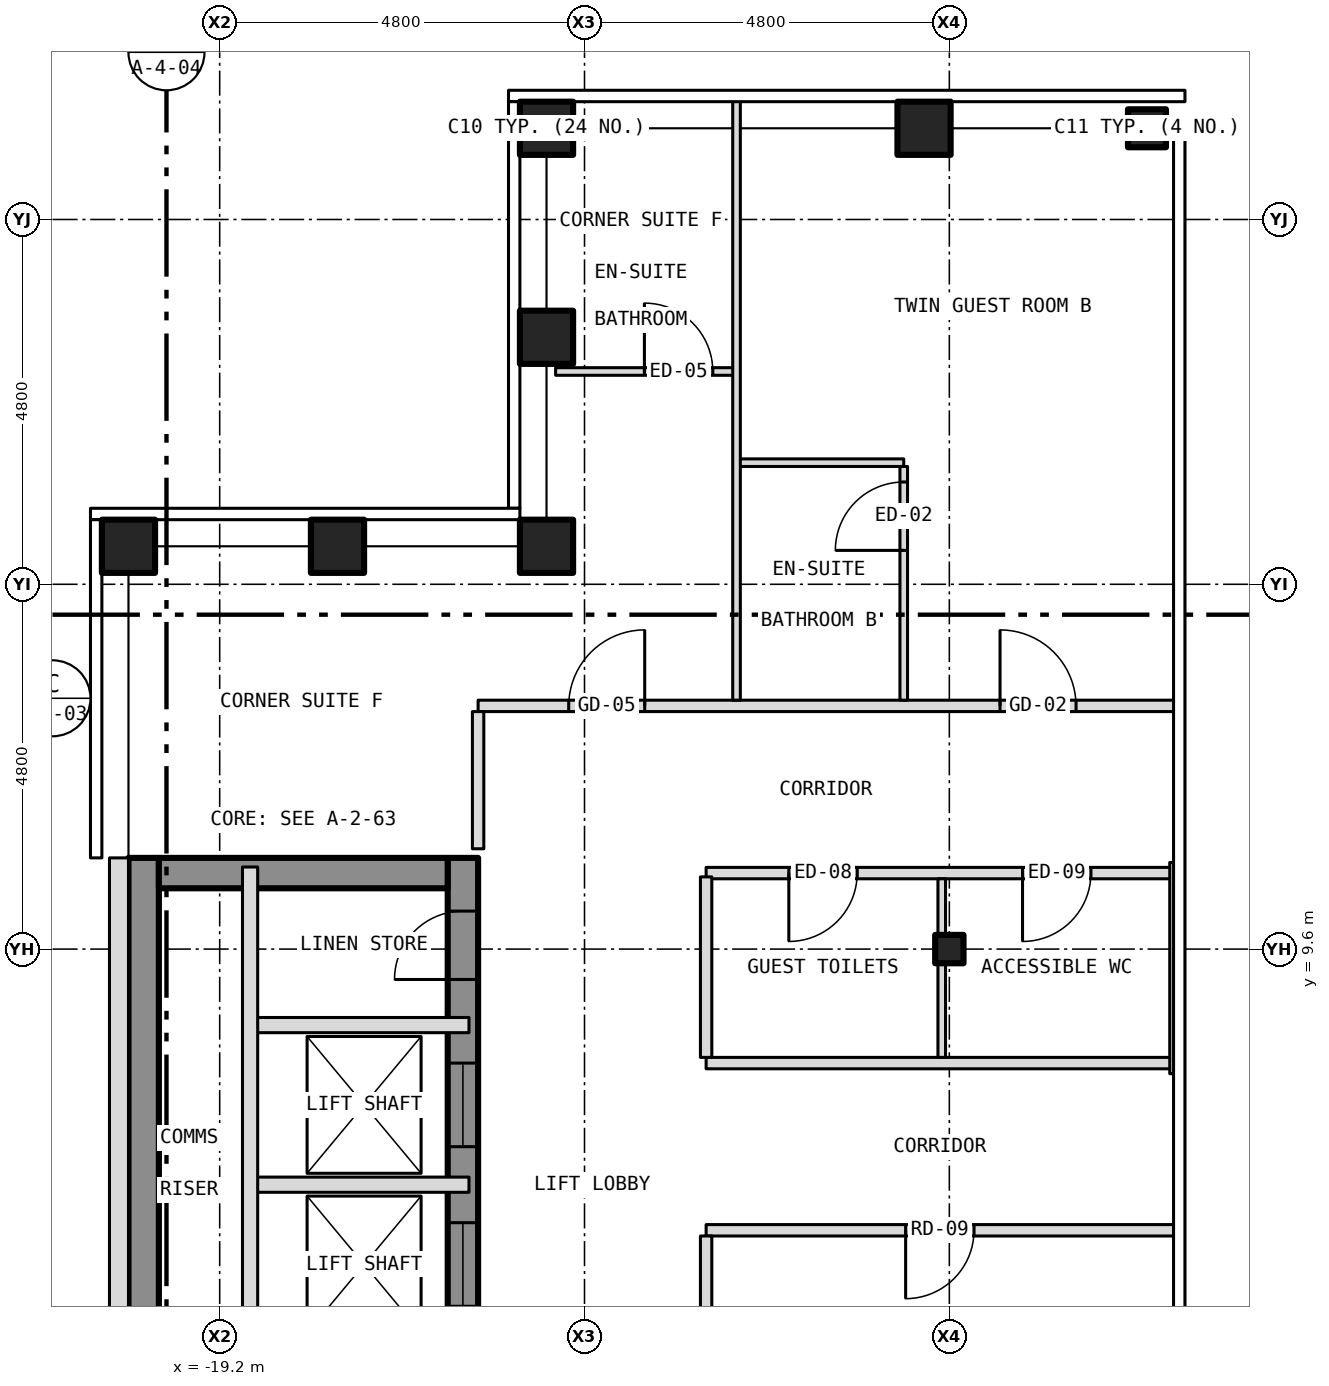
"""IFC4 building model, lengths in metres.
Left out: names, types, materials, properties, quantities, classifications, styles, units other than length and angle.
Written with IfcOpenShell. Run it as: python <this file> out.ifc"""

import sys

from ifc_helpers import new_model, si_unit, direction, frame, frame_2d, origin, origin_2d, place, context, subcontext, project, spatial, rectangle, hollow_rectangle, i_section, extrude, element, fill, save


model = new_model("IFC4")
c1 = context("Model", 3, precision=1e-05, world=origin(), true_north=direction((0.0, 1.0)))
c2 = subcontext(c1, "Body", "Model", "MODEL_VIEW")
j1 = project(units=[si_unit("LENGTHUNIT", "METRE"), si_unit("PLANEANGLEUNIT", "RADIAN")], contexts=[c1])
p1 = place(None, origin())
s1 = spatial("IfcSite", under=j1, at=p1, CompositionType="ELEMENT")
p2 = place(p1, origin())
s2 = spatial("IfcBuilding", under=s1, at=p2, CompositionType="ELEMENT")
p3 = place(p2, frame((0.0, 0.0, 229.5)))
s3 = spatial("IfcBuildingStorey", under=s2, at=p3, CompositionType="ELEMENT", Elevation=229.5)
for number, where, z_axis, x_axis in (
    (1, (-14.9, 20.4, -0.15), (0.0, 0.0, 1.0), (1.0, 0.0, 0.0)),
    (2, (-9.933, 20.4, -0.15), (0.0, 0.0, 1.0), (1.0, 0.0, 0.0)),
    (3, (-20.4, 14.9, -0.15), (0.0, 0.0, 1.0), (1.0, 0.0, 0.0)),
    (4, (-14.9, 14.9, -0.15), (0.0, 0.0, 1.0), (1.0, 0.0, 0.0)),
    (5, (-14.9, 17.65, -0.15), (0.0, 0.0, 1.0), (1.0, 0.0, 0.0)),
    (6, (-17.65, 14.9, -0.15), (0.0, 0.0, 1.0), (1.0, 0.0, 0.0)),
):
    element("IfcColumn", number, at=place(p3, frame(where, z_axis=z_axis, x_axis=x_axis)), inside=s3, PredefinedType="COLUMN", context=c2, shape_type="SweptSolid", body=[
        extrude(hollow_rectangle(XDim=0.7, YDim=0.7, WallThickness=0.04, at=origin_2d()), origin(), (0.0, 0.0, 1.0), 3.5),
    ])
p4 = place(p3, frame((-7.0, 20.4, -0.15), z_axis=(0.0, 0.0, 1.0), x_axis=(1.0, 0.0, 0.0)))
e7 = element("IfcColumn", 7, at=p4, inside=s3, PredefinedType="COLUMN", context=c2, shape_type="SweptSolid", body=[
    extrude(hollow_rectangle(XDim=0.5, YDim=0.5, WallThickness=0.03, at=origin_2d()), origin(), (0.0, 0.0, 1.0), 3.5),
])
p5 = place(p3, frame((-9.6, 9.6, -0.15), z_axis=(0.0, 0.0, 1.0), x_axis=(1.0, 0.0, 0.0)))
e8 = element("IfcColumn", 8, at=p5, inside=s3, PredefinedType="COLUMN", context=c2, shape_type="SweptSolid", body=[
    extrude(i_section(OverallWidth=0.373, OverallDepth=0.373, WebThickness=0.016, FlangeThickness=0.026, at=origin_2d()), origin(), (0.0, 0.0, 1.0), 3.5),
])
p6 = place(p3, frame((-16.0, -10.8, 0.0), z_axis=(0.0, 0.0, 1.0), x_axis=(0.0, 1.0, 0.0)))
e9 = element("IfcWall", 9, at=p6, inside=s3, PredefinedType="SHEAR", context=c2, shape_type="SweptSolid", body=[
    extrude(rectangle(XDim=21.6, YDim=0.4, at=frame_2d((10.8, 0.0))), origin(), (0.0, 0.0, 1.0), 3.25),
])
p7 = place(p6, frame((9.4, 0.0, 0.0)))
e10 = element("IfcOpeningElement", 10, at=p7, cuts=e9, PredefinedType="OPENING", context=c2, shape_type="SweptSolid", body=[
    extrude(rectangle(XDim=1.1, YDim=2.1, at=frame_2d((0.55, 1.05))), frame((0.0, 0.212, 0.0), z_axis=(0.0, -1.0, 0.0), x_axis=(1.0, 0.0, 0.0)), (0.0, 0.0, 1.0), 0.424),
])
p8 = place(p6, frame((11.5, 0.0, 0.0)))
e11 = element("IfcOpeningElement", 11, at=p8, cuts=e9, PredefinedType="OPENING", context=c2, shape_type="SweptSolid", body=[
    extrude(rectangle(XDim=1.1, YDim=2.1, at=frame_2d((0.55, 1.05))), frame((0.0, 0.212, 0.0), z_axis=(0.0, -1.0, 0.0), x_axis=(1.0, 0.0, 0.0)), (0.0, 0.0, 1.0), 0.424),
])
p9 = place(p6, frame((13.6, 0.0, 0.0)))
e12 = element("IfcOpeningElement", 12, at=p9, cuts=e9, PredefinedType="OPENING", context=c2, shape_type="SweptSolid", body=[
    extrude(rectangle(XDim=1.1, YDim=2.1, at=frame_2d((0.55, 1.05))), frame((0.0, 0.212, 0.0), z_axis=(0.0, -1.0, 0.0), x_axis=(1.0, 0.0, 0.0)), (0.0, 0.0, 1.0), 0.424),
])
p10 = place(p6, frame((15.7, 0.0, 0.0)))
e13 = element("IfcOpeningElement", 13, at=p10, cuts=e9, PredefinedType="OPENING", context=c2, shape_type="SweptSolid", body=[
    extrude(rectangle(XDim=1.1, YDim=2.1, at=frame_2d((0.55, 1.05))), frame((0.0, 0.212, 0.0), z_axis=(0.0, -1.0, 0.0), x_axis=(1.0, 0.0, 0.0)), (0.0, 0.0, 1.0), 0.424),
])
p11 = place(p6, frame((17.8, 0.0, 0.0)))
e14 = element("IfcOpeningElement", 14, at=p11, cuts=e9, PredefinedType="OPENING", context=c2, shape_type="SweptSolid", body=[
    extrude(rectangle(XDim=1.1, YDim=2.1, at=frame_2d((0.55, 1.05))), frame((0.0, 0.212, 0.0), z_axis=(0.0, -1.0, 0.0), x_axis=(1.0, 0.0, 0.0)), (0.0, 0.0, 1.0), 0.424),
])
p12 = place(p6, frame((0.458, 0.0, 0.0)))
e15 = element("IfcOpeningElement", 15, at=p12, cuts=e9, PredefinedType="OPENING", context=c2, shape_type="SweptSolid", body=[
    extrude(rectangle(XDim=1.1, YDim=2.1, at=frame_2d((0.55, 1.05))), frame((0.0, 0.212, 0.0), z_axis=(0.0, -1.0, 0.0), x_axis=(1.0, 0.0, 0.0)), (0.0, 0.0, 1.0), 0.424),
])
p13 = place(p6, frame((7.5, 0.0, 0.0)))
e16 = element("IfcOpeningElement", 16, at=p13, cuts=e9, PredefinedType="OPENING", context=c2, shape_type="SweptSolid", body=[
    extrude(rectangle(XDim=1.1, YDim=2.1, at=frame_2d((0.55, 1.05))), frame((0.0, 0.212, 0.0), z_axis=(0.0, -1.0, 0.0), x_axis=(1.0, 0.0, 0.0)), (0.0, 0.0, 1.0), 0.424),
])
p14 = place(p6, frame((20.0, 0.0, 0.0)))
e17 = element("IfcOpeningElement", 17, at=p14, cuts=e9, PredefinedType="OPENING", context=c2, shape_type="SweptSolid", body=[
    extrude(rectangle(XDim=0.9, YDim=2.1, at=frame_2d((0.45, 1.05))), frame((0.0, 0.212, 0.0), z_axis=(0.0, -1.0, 0.0), x_axis=(1.0, 0.0, 0.0)), (0.0, 0.0, 1.0), 0.424),
])
p15 = place(p3, frame((-20.2, -10.8, 0.0), z_axis=(0.0, 0.0, 1.0), x_axis=(0.0, 1.0, 0.0)))
e18 = element("IfcWall", 18, at=p15, inside=s3, PredefinedType="SHEAR", context=c2, shape_type="SweptSolid", body=[
    extrude(rectangle(XDim=21.6, YDim=0.4, at=frame_2d((10.8, 0.0))), origin(), (0.0, 0.0, 1.0), 3.25),
])
p16 = place(p3, frame((-20.0, 10.6, 0.0), z_axis=(0.0, 0.0, 1.0), x_axis=(1.0, 0.0, 0.0)))
e19 = element("IfcWall", 19, at=p16, inside=s3, PredefinedType="SHEAR", context=c2, shape_type="SweptSolid", body=[
    extrude(rectangle(XDim=3.8, YDim=0.4, at=frame_2d((1.9, 0.0))), origin(), (0.0, 0.0, 1.0), 3.25),
])
p17 = place(p3, frame((-20.525, 10.8, 0.0), z_axis=(0.0, 0.0, 1.0), x_axis=(0.0, -1.0, 0.0)))
e20 = element("IfcWall", 20, at=p17, inside=s3, PredefinedType="SOLIDWALL", context=c2, shape_type="SweptSolid", body=[
    extrude(rectangle(XDim=21.6, YDim=0.25, at=frame_2d((10.8, 0.0))), origin(), (0.0, 0.0, 1.0), 3.5),
])
p18 = place(p17, frame((18.05, 0.0, 1.0)))
e21 = element("IfcOpeningElement", 21, at=p18, cuts=e20, PredefinedType="OPENING", context=c2, shape_type="SweptSolid", body=[
    extrude(rectangle(XDim=0.6, YDim=1.5, at=frame_2d((0.3, 0.75))), frame((0.0, 0.137, 0.0), z_axis=(0.0, -1.0, 0.0), x_axis=(1.0, 0.0, 0.0)), (0.0, 0.0, 1.0), 0.274),
])
p19 = place(p3, frame((-12.8, 5.9, 0.0), z_axis=(0.0, 0.0, 1.0), x_axis=(1.0, 0.0, 0.0)))
e22 = element("IfcWall", 22, at=p19, inside=s3, PredefinedType="PARTITIONING", context=c2, shape_type="SweptSolid", body=[
    extrude(rectangle(XDim=6.18, YDim=0.15, at=frame_2d((3.09, 0.0))), origin(), (0.0, 0.0, 1.0), 3.35),
])
p20 = place(p19, frame((2.625, 0.0, 0.0)))
e23 = element("IfcOpeningElement", 23, at=p20, cuts=e22, PredefinedType="OPENING", context=c2, shape_type="SweptSolid", body=[
    extrude(rectangle(XDim=0.9, YDim=2.1, at=frame_2d((0.45, 1.05))), frame((0.0, 0.087, 0.0), z_axis=(0.0, -1.0, 0.0), x_axis=(1.0, 0.0, 0.0)), (0.0, 0.0, 1.0), 0.174),
])
p21 = place(p3, frame((-18.8, 6.5, 0.0), z_axis=(0.0, 0.0, 1.0), x_axis=(1.0, 0.0, 0.0)))
e24 = element("IfcWall", 24, at=p21, inside=s3, PredefinedType="PARTITIONING", context=c2, shape_type="SweptSolid", body=[
    extrude(rectangle(XDim=2.88, YDim=0.2, at=frame_2d((1.44, 0.0))), origin(), (0.0, 0.0, 1.0), 3.25),
])
p22 = place(p3, frame((-12.8, 8.1, 0.0), z_axis=(0.0, 0.0, 1.0), x_axis=(1.0, 0.0, 0.0)))
e25 = element("IfcWall", 25, at=p22, inside=s3, PredefinedType="PARTITIONING", context=c2, shape_type="SweptSolid", body=[
    extrude(rectangle(XDim=6.15, YDim=0.15, at=frame_2d((3.075, 0.0))), origin(), (0.0, 0.0, 1.0), 3.35),
])
p23 = place(p3, frame((-18.8, 8.6, 0.0), z_axis=(0.0, 0.0, 1.0), x_axis=(1.0, 0.0, 0.0)))
e26 = element("IfcWall", 26, at=p23, inside=s3, PredefinedType="PARTITIONING", context=c2, shape_type="SweptSolid", body=[
    extrude(rectangle(XDim=2.88, YDim=0.2, at=frame_2d((1.44, 0.0))), origin(), (0.0, 0.0, 1.0), 3.25),
])
p24 = place(p3, frame((-12.8, 10.6, 0.0), z_axis=(0.0, 0.0, 1.0), x_axis=(1.0, 0.0, 0.0)))
e27 = element("IfcWall", 27, at=p24, inside=s3, PredefinedType="PARTITIONING", context=c2, shape_type="SweptSolid", body=[
    extrude(rectangle(XDim=6.15, YDim=0.15, at=frame_2d((3.075, 0.0))), origin(), (0.0, 0.0, 1.0), 3.35),
])
p25 = place(p24, frame((1.088, 0.0, 0.0)))
e28 = element("IfcOpeningElement", 28, at=p25, cuts=e27, PredefinedType="OPENING", context=c2, shape_type="SweptSolid", body=[
    extrude(rectangle(XDim=0.9, YDim=2.1, at=frame_2d((0.45, 1.05))), frame((0.0, 0.087, 0.0), z_axis=(0.0, -1.0, 0.0), x_axis=(1.0, 0.0, 0.0)), (0.0, 0.0, 1.0), 0.174),
])
p26 = place(p24, frame((4.163, 0.0, 0.0)))
e29 = element("IfcOpeningElement", 29, at=p26, cuts=e27, PredefinedType="OPENING", context=c2, shape_type="SweptSolid", body=[
    extrude(rectangle(XDim=0.9, YDim=2.1, at=frame_2d((0.45, 1.05))), frame((0.0, 0.087, 0.0), z_axis=(0.0, -1.0, 0.0), x_axis=(1.0, 0.0, 0.0)), (0.0, 0.0, 1.0), 0.174),
])
p27 = place(p3, frame((-15.8, 12.8, 0.0), z_axis=(0.0, 0.0, 1.0), x_axis=(1.0, 0.0, 0.0)))
e30 = element("IfcWall", 30, at=p27, inside=s3, PredefinedType="PARTITIONING", context=c2, shape_type="SweptSolid", body=[
    extrude(rectangle(XDim=9.18, YDim=0.15, at=frame_2d((4.59, 0.0))), origin(), (0.0, 0.0, 1.0), 3.35),
])
p28 = place(p27, frame((6.867, 0.0, 0.0)))
e31 = element("IfcOpeningElement", 31, at=p28, cuts=e30, PredefinedType="OPENING", context=c2, shape_type="SweptSolid", body=[
    extrude(rectangle(XDim=1.0, YDim=2.1, at=frame_2d((0.5, 1.05))), frame((0.0, 0.087, 0.0), z_axis=(0.0, -1.0, 0.0), x_axis=(1.0, 0.0, 0.0)), (0.0, 0.0, 1.0), 0.174),
])
p29 = place(p27, frame((1.192, 0.0, 0.0)))
e32 = element("IfcOpeningElement", 32, at=p29, cuts=e30, PredefinedType="OPENING", context=c2, shape_type="SweptSolid", body=[
    extrude(rectangle(XDim=1.0, YDim=2.1, at=frame_2d((0.5, 1.05))), frame((0.0, 0.087, 0.0), z_axis=(0.0, -1.0, 0.0), x_axis=(1.0, 0.0, 0.0)), (0.0, 0.0, 1.0), 0.174),
])
p30 = place(p3, frame((-12.4, 16.0, 0.0), z_axis=(0.0, 0.0, 1.0), x_axis=(1.0, 0.0, 0.0)))
e33 = element("IfcWall", 33, at=p30, inside=s3, PredefinedType="PARTITIONING", context=c2, shape_type="SweptSolid", body=[
    extrude(rectangle(XDim=2.2, YDim=0.1, at=frame_2d((1.1, 0.0))), origin(), (0.0, 0.0, 1.0), 3.35),
])
p31 = place(p3, frame((-14.78, 17.2, 0.0), z_axis=(0.0, 0.0, 1.0), x_axis=(1.0, 0.0, 0.0)))
e34 = element("IfcWall", 34, at=p31, inside=s3, PredefinedType="PARTITIONING", context=c2, shape_type="SweptSolid", body=[
    extrude(rectangle(XDim=2.38, YDim=0.1, at=frame_2d((1.19, 0.0))), origin(), (0.0, 0.0, 1.0), 3.35),
])
p32 = place(p31, frame((1.168, 0.0, 0.0)))
e35 = element("IfcOpeningElement", 35, at=p32, cuts=e34, PredefinedType="OPENING", context=c2, shape_type="SweptSolid", body=[
    extrude(rectangle(XDim=0.9, YDim=2.1, at=frame_2d((0.45, 1.05))), frame((0.0, 0.062, 0.0), z_axis=(0.0, -1.0, 0.0), x_axis=(1.0, 0.0, 0.0)), (0.0, 0.0, 1.0), 0.124),
])
p33 = place(p3, frame((-18.8, -1.8, 0.0), z_axis=(0.0, 0.0, 1.0), x_axis=(0.0, 1.0, 0.0)))
e36 = element("IfcWall", 36, at=p33, inside=s3, PredefinedType="PARTITIONING", context=c2, shape_type="SweptSolid", body=[
    extrude(rectangle(XDim=12.48, YDim=0.2, at=frame_2d((6.24, 0.0))), origin(), (0.0, 0.0, 1.0), 3.25),
])
p34 = place(p3, frame((-15.8, 10.92, 0.0), z_axis=(0.0, 0.0, 1.0), x_axis=(0.0, 1.0, 0.0)))
e37 = element("IfcWall", 37, at=p34, inside=s3, PredefinedType="PARTITIONING", context=c2, shape_type="SweptSolid", body=[
    extrude(rectangle(XDim=1.805, YDim=0.15, at=frame_2d((0.903, 0.0))), origin(), (0.0, 0.0, 1.0), 3.35),
])
p35 = place(p3, frame((-12.8, 2.4, 0.0), z_axis=(0.0, 0.0, 1.0), x_axis=(0.0, 1.0, 0.0)))
e38 = element("IfcWall", 38, at=p35, inside=s3, PredefinedType="PARTITIONING", context=c2, shape_type="SweptSolid", body=[
    extrude(rectangle(XDim=3.425, YDim=0.15, at=frame_2d((1.712, 0.0))), origin(), (0.0, 0.0, 1.0), 3.35),
])
p36 = place(p3, frame((-12.8, 8.175, 0.0), z_axis=(0.0, 0.0, 1.0), x_axis=(0.0, 1.0, 0.0)))
e39 = element("IfcWall", 39, at=p36, inside=s3, PredefinedType="PARTITIONING", context=c2, shape_type="SweptSolid", body=[
    extrude(rectangle(XDim=2.375, YDim=0.15, at=frame_2d((1.188, 0.0))), origin(), (0.0, 0.0, 1.0), 3.35),
])
p37 = place(p3, frame((-12.4, 12.875, 0.0), z_axis=(0.0, 0.0, 1.0), x_axis=(0.0, 1.0, 0.0)))
e40 = element("IfcWall", 40, at=p37, inside=s3, PredefinedType="PARTITIONING", context=c2, shape_type="SweptSolid", body=[
    extrude(rectangle(XDim=7.905, YDim=0.1, at=frame_2d((3.953, 0.0))), origin(), (0.0, 0.0, 1.0), 3.35),
])
p38 = place(p3, frame((-10.2, 12.875, 0.0), z_axis=(0.0, 0.0, 1.0), x_axis=(0.0, 1.0, 0.0)))
e41 = element("IfcWall", 41, at=p38, inside=s3, PredefinedType="PARTITIONING", context=c2, shape_type="SweptSolid", body=[
    extrude(rectangle(XDim=3.075, YDim=0.1, at=frame_2d((1.538, 0.0))), origin(), (0.0, 0.0, 1.0), 3.35),
])
p39 = place(p38, frame((1.971, 0.0, 0.0)))
e42 = element("IfcOpeningElement", 42, at=p39, cuts=e41, PredefinedType="OPENING", context=c2, shape_type="SweptSolid", body=[
    extrude(rectangle(XDim=0.9, YDim=2.1, at=frame_2d((0.45, 1.05))), frame((0.0, 0.062, 0.0), z_axis=(0.0, -1.0, 0.0), x_axis=(1.0, 0.0, 0.0)), (0.0, 0.0, 1.0), 0.124),
])
p40 = place(p3, frame((-9.7, 8.175, 0.0), z_axis=(0.0, 0.0, 1.0), x_axis=(0.0, 1.0, 0.0)))
e43 = element("IfcWall", 43, at=p40, inside=s3, PredefinedType="PARTITIONING", context=c2, shape_type="SweptSolid", body=[
    extrude(rectangle(XDim=1.238, YDim=0.1, at=frame_2d((0.619, 0.0))), origin(), (0.0, 0.0, 1.0), 2.728),
])
p41 = place(p3, frame((-9.7, 9.413, 0.0), z_axis=(0.0, 0.0, 1.0), x_axis=(0.0, 1.0, 0.0)))
e44 = element("IfcWall", 44, at=p41, inside=s3, PredefinedType="PARTITIONING", context=c2, shape_type="SweptSolid", body=[
    extrude(rectangle(XDim=0.374, YDim=0.1, at=frame_2d((0.187, 0.0))), origin(), (0.0, 0.0, 1.0), 3.35),
])
p42 = place(p3, frame((-9.7, 9.787, 0.0), z_axis=(0.0, 0.0, 1.0), x_axis=(0.0, 1.0, 0.0)))
e45 = element("IfcWall", 45, at=p42, inside=s3, PredefinedType="PARTITIONING", context=c2, shape_type="SweptSolid", body=[
    extrude(rectangle(XDim=0.738, YDim=0.1, at=frame_2d((0.369, 0.0))), origin(), (0.0, 0.0, 1.0), 2.728),
])
p43 = place(p3, frame((-6.65, 7.96, 0.0), z_axis=(0.0, 0.0, 1.0), x_axis=(0.0, 1.0, 0.0)))
e46 = element("IfcWall", 46, at=p43, inside=s3, PredefinedType="PARTITIONING", context=c2, shape_type="SweptSolid", body=[
    extrude(rectangle(XDim=2.78, YDim=0.1, at=frame_2d((1.39, 0.0))), origin(), (0.0, 0.0, 1.0), 3.35),
])
p44 = place(p10, origin())
e47 = element("IfcDoor", 47, at=p44, inside=s3, OperationType="SLIDING_TO_LEFT", PredefinedType="DOOR", context=c2, shape_type="SweptSolid", body=[
    extrude(rectangle(XDim=1.1, YDim=2.1, at=frame_2d((0.55, 1.05))), frame((0.0, 0.025, 0.0), z_axis=(0.0, -1.0, 0.0), x_axis=(1.0, 0.0, 0.0)), (0.0, 0.0, 1.0), 0.05),
])
fill(e13, e47)
p45 = place(p11, origin())
e48 = element("IfcDoor", 48, at=p45, inside=s3, OperationType="SLIDING_TO_LEFT", PredefinedType="DOOR", context=c2, shape_type="SweptSolid", body=[
    extrude(rectangle(XDim=1.1, YDim=2.1, at=frame_2d((0.55, 1.05))), frame((0.0, 0.025, 0.0), z_axis=(0.0, -1.0, 0.0), x_axis=(1.0, 0.0, 0.0)), (0.0, 0.0, 1.0), 0.05),
])
fill(e14, e48)
p46 = place(p14, origin())
e49 = element("IfcDoor", 49, at=p46, inside=s3, OperationType="SINGLE_SWING_LEFT", PredefinedType="DOOR", context=c2, shape_type="SweptSolid", body=[
    extrude(rectangle(XDim=0.9, YDim=2.1, at=frame_2d((0.45, 1.05))), frame((0.0, 0.025, 0.0), z_axis=(0.0, -1.0, 0.0), x_axis=(1.0, 0.0, 0.0)), (0.0, 0.0, 1.0), 0.05),
])
fill(e17, e49)
p47 = place(p28, origin())
e50 = element("IfcDoor", 50, at=p47, inside=s3, OperationType="SINGLE_SWING_LEFT", PredefinedType="DOOR", context=c2, shape_type="SweptSolid", body=[
    extrude(rectangle(XDim=1.0, YDim=2.1, at=frame_2d((0.5, 1.05))), frame((0.0, 0.025, 0.0), z_axis=(0.0, -1.0, 0.0), x_axis=(1.0, 0.0, 0.0)), (0.0, 0.0, 1.0), 0.05),
])
fill(e31, e50)
p48 = place(p39, origin())
e51 = element("IfcDoor", 51, at=p48, inside=s3, OperationType="SINGLE_SWING_LEFT", PredefinedType="DOOR", context=c2, shape_type="SweptSolid", body=[
    extrude(rectangle(XDim=0.9, YDim=2.1, at=frame_2d((0.45, 1.05))), frame((0.0, 0.025, 0.0), z_axis=(0.0, -1.0, 0.0), x_axis=(1.0, 0.0, 0.0)), (0.0, 0.0, 1.0), 0.05),
])
fill(e42, e51)
p49 = place(p32, origin())
e52 = element("IfcDoor", 52, at=p49, inside=s3, OperationType="SINGLE_SWING_LEFT", PredefinedType="DOOR", context=c2, shape_type="SweptSolid", body=[
    extrude(rectangle(XDim=0.9, YDim=2.1, at=frame_2d((0.45, 1.05))), frame((0.0, 0.025, 0.0), z_axis=(0.0, -1.0, 0.0), x_axis=(1.0, 0.0, 0.0)), (0.0, 0.0, 1.0), 0.05),
])
fill(e35, e52)
p50 = place(p29, origin())
e53 = element("IfcDoor", 53, at=p50, inside=s3, OperationType="SINGLE_SWING_RIGHT", PredefinedType="DOOR", context=c2, shape_type="SweptSolid", body=[
    extrude(rectangle(XDim=1.0, YDim=2.1, at=frame_2d((0.5, 1.05))), frame((0.0, 0.025, 0.0), z_axis=(0.0, -1.0, 0.0), x_axis=(1.0, 0.0, 0.0)), (0.0, 0.0, 1.0), 0.05),
])
fill(e32, e53)
p51 = place(p25, origin())
e54 = element("IfcDoor", 54, at=p51, inside=s3, OperationType="SINGLE_SWING_LEFT", PredefinedType="DOOR", context=c2, shape_type="SweptSolid", body=[
    extrude(rectangle(XDim=0.9, YDim=2.1, at=frame_2d((0.45, 1.05))), frame((0.0, 0.025, 0.0), z_axis=(0.0, -1.0, 0.0), x_axis=(1.0, 0.0, 0.0)), (0.0, 0.0, 1.0), 0.05),
])
fill(e28, e54)
p52 = place(p26, origin())
e55 = element("IfcDoor", 55, at=p52, inside=s3, OperationType="SINGLE_SWING_LEFT", PredefinedType="DOOR", context=c2, shape_type="SweptSolid", body=[
    extrude(rectangle(XDim=0.9, YDim=2.1, at=frame_2d((0.45, 1.05))), frame((0.0, 0.025, 0.0), z_axis=(0.0, -1.0, 0.0), x_axis=(1.0, 0.0, 0.0)), (0.0, 0.0, 1.0), 0.05),
])
fill(e29, e55)
p53 = place(p20, origin())
e56 = element("IfcDoor", 56, at=p53, inside=s3, OperationType="SINGLE_SWING_LEFT", PredefinedType="DOOR", context=c2, shape_type="SweptSolid", body=[
    extrude(rectangle(XDim=0.9, YDim=2.1, at=frame_2d((0.45, 1.05))), frame((0.0, 0.025, 0.0), z_axis=(0.0, -1.0, 0.0), x_axis=(1.0, 0.0, 0.0)), (0.0, 0.0, 1.0), 0.05),
])
fill(e23, e56)
save(model, sys.argv[1])
